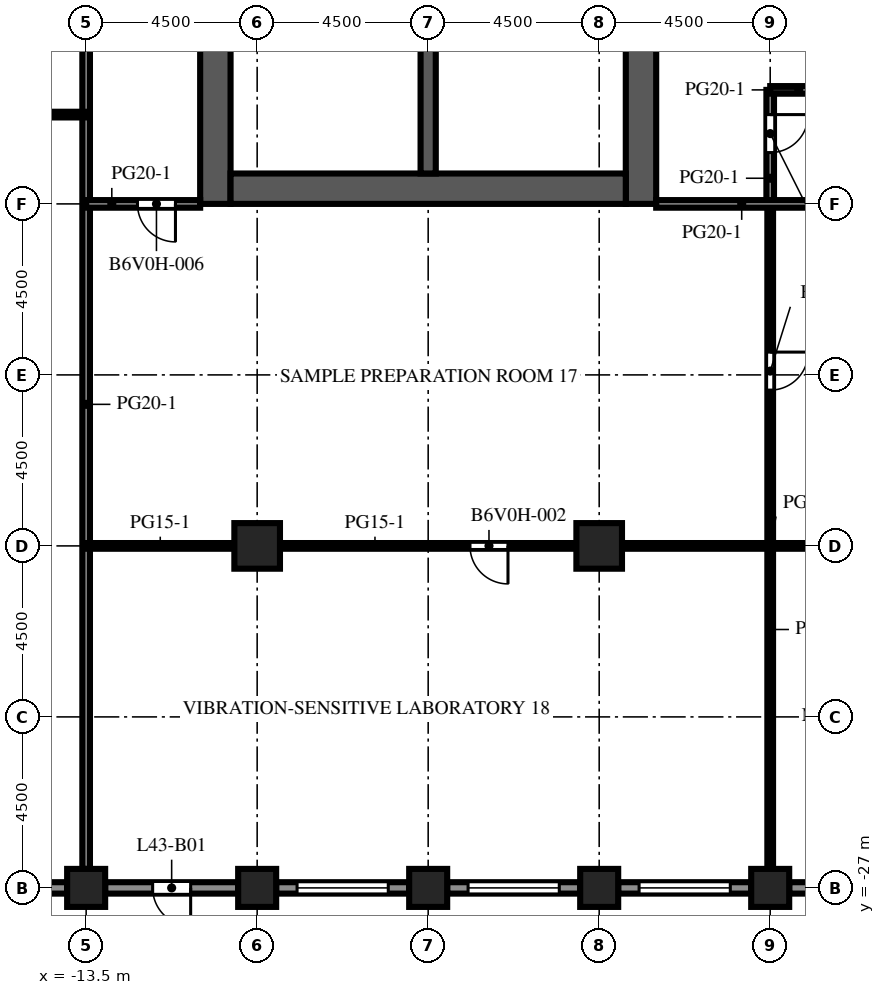
"""IFC4 building model, lengths in metres.
Left out: names, types, materials, properties, quantities, classifications, styles, units other than length and angle.
Written with IfcOpenShell. Run it as: python <this file> out.ifc"""

import sys

from ifc_helpers import new_model, si_unit, direction, frame, frame_2d, origin, origin_2d, place, context, subcontext, project, spatial, rectangle, extrude, element, fill, save


model = new_model("IFC4")
c1 = context("Model", 3, precision=1e-05, world=origin(), true_north=direction((0.0, 1.0)))
c2 = subcontext(c1, "Body", "Model", "MODEL_VIEW")
j1 = project(units=[si_unit("LENGTHUNIT", "METRE"), si_unit("PLANEANGLEUNIT", "RADIAN")], contexts=[c1])
p1 = place(None, origin())
s1 = spatial("IfcSite", under=j1, at=p1, CompositionType="ELEMENT")
p2 = place(p1, origin())
s2 = spatial("IfcBuilding", under=s1, at=p2, CompositionType="ELEMENT")
p3 = place(p2, frame((0.0, 0.0, 191.5)))
s3 = spatial("IfcBuildingStorey", under=s2, at=p3, CompositionType="ELEMENT", Elevation=191.5)
for number, where, z_axis, x_axis in (
    (1, (-13.5, -27.0, 0.0), (0.0, 0.0, 1.0), (1.0, 0.0, 0.0)),
    (2, (-9.0, -27.0, 0.0), (0.0, 0.0, 1.0), (1.0, 0.0, 0.0)),
    (3, (-4.5, -27.0, 0.0), (0.0, 0.0, 1.0), (1.0, 0.0, 0.0)),
    (4, (0.0, -27.0, 0.0), (0.0, 0.0, 1.0), (1.0, 0.0, 0.0)),
    (5, (4.5, -27.0, 0.0), (0.0, 0.0, 1.0), (1.0, 0.0, 0.0)),
):
    element("IfcColumn", number, at=place(p3, frame(where, z_axis=z_axis, x_axis=x_axis)), inside=s3, PredefinedType="COLUMN", context=c2, shape_type="SweptSolid", body=[
        extrude(rectangle(XDim=1.0, YDim=1.0, at=origin_2d()), origin(), (0.0, 0.0, 1.0), 4.1),
    ])
for number, where, z_axis, x_axis in (
    (6, (-9.0, -18.0, 0.0), (0.0, 0.0, 1.0), (1.0, 0.0, 0.0)),
    (7, (0.0, -18.0, 0.0), (0.0, 0.0, 1.0), (1.0, 0.0, 0.0)),
):
    element("IfcColumn", number, at=place(p3, frame(where, z_axis=z_axis, x_axis=x_axis)), inside=s3, PredefinedType="COLUMN", context=c2, shape_type="SweptSolid", body=[
        extrude(rectangle(XDim=1.2, YDim=1.2, at=origin_2d()), origin(), (0.0, 0.0, 1.0), 4.1),
    ])
p4 = place(p3, frame((-10.1, -9.0, 0.0), z_axis=(0.0, 0.0, 1.0), x_axis=(0.0, 1.0, 0.0)))
e8 = element("IfcWall", 8, at=p4, inside=s3, PredefinedType="SHEAR", context=c2, shape_type="SweptSolid", body=[
    extrude(rectangle(XDim=27.5, YDim=0.8, at=frame_2d((13.75, 0.0))), origin(), (0.0, 0.0, 1.0), 4.1),
])
p5 = place(p4, frame((12.55, 0.0, 0.0)))
e9 = element("IfcOpeningElement", 9, at=p5, cuts=e8, PredefinedType="OPENING", context=c2, shape_type="SweptSolid", body=[
    extrude(rectangle(XDim=2.4, YDim=2.4, at=frame_2d((1.2, 1.2))), frame((0.0, 0.41, 0.0), z_axis=(0.0, -1.0, 0.0), x_axis=(1.0, 0.0, 0.0)), (0.0, 0.0, 1.0), 0.82),
])
p6 = place(p4, frame((6.825, 0.0, 0.0)))
e10 = element("IfcOpeningElement", 10, at=p6, cuts=e8, PredefinedType="OPENING", context=c2, shape_type="SweptSolid", body=[
    extrude(rectangle(XDim=1.2, YDim=2.1, at=frame_2d((0.6, 1.05))), frame((0.0, 0.41, 0.0), z_axis=(0.0, -1.0, 0.0), x_axis=(1.0, 0.0, 0.0)), (0.0, 0.0, 1.0), 0.82),
])
p7 = place(p4, frame((19.475, 0.0, 0.0)))
e11 = element("IfcOpeningElement", 11, at=p7, cuts=e8, PredefinedType="OPENING", context=c2, shape_type="SweptSolid", body=[
    extrude(rectangle(XDim=1.2, YDim=2.1, at=frame_2d((0.6, 1.05))), frame((0.0, 0.41, 0.0), z_axis=(0.0, -1.0, 0.0), x_axis=(1.0, 0.0, 0.0)), (0.0, 0.0, 1.0), 0.82),
])
p8 = place(p3, frame((1.1, -9.0, 0.0), z_axis=(0.0, 0.0, 1.0), x_axis=(0.0, 1.0, 0.0)))
e12 = element("IfcWall", 12, at=p8, inside=s3, PredefinedType="SHEAR", context=c2, shape_type="SweptSolid", body=[
    extrude(rectangle(XDim=27.5, YDim=0.8, at=frame_2d((13.75, 0.0))), origin(), (0.0, 0.0, 1.0), 4.1),
])
p9 = place(p8, frame((12.55, 0.0, 0.0)))
e13 = element("IfcOpeningElement", 13, at=p9, cuts=e12, PredefinedType="OPENING", context=c2, shape_type="SweptSolid", body=[
    extrude(rectangle(XDim=2.4, YDim=2.4, at=frame_2d((1.2, 1.2))), frame((0.0, 0.41, 0.0), z_axis=(0.0, -1.0, 0.0), x_axis=(1.0, 0.0, 0.0)), (0.0, 0.0, 1.0), 0.82),
])
p10 = place(p8, frame((3.95, 0.0, 0.0)))
e14 = element("IfcOpeningElement", 14, at=p10, cuts=e12, PredefinedType="OPENING", context=c2, shape_type="SweptSolid", body=[
    extrude(rectangle(XDim=1.2, YDim=2.1, at=frame_2d((0.6, 1.05))), frame((0.0, 0.41, 0.0), z_axis=(0.0, -1.0, 0.0), x_axis=(1.0, 0.0, 0.0)), (0.0, 0.0, 1.0), 0.82),
])
p11 = place(p8, frame((19.45, 0.0, 0.0)))
e15 = element("IfcOpeningElement", 15, at=p11, cuts=e12, PredefinedType="OPENING", context=c2, shape_type="SweptSolid", body=[
    extrude(rectangle(XDim=1.0, YDim=2.1, at=frame_2d((0.5, 1.05))), frame((0.0, 0.41, 0.0), z_axis=(0.0, -1.0, 0.0), x_axis=(1.0, 0.0, 0.0)), (0.0, 0.0, 1.0), 0.82),
])
p12 = place(p8, frame((21.137, 0.0, 0.0)))
e16 = element("IfcOpeningElement", 16, at=p12, cuts=e12, PredefinedType="OPENING", context=c2, shape_type="SweptSolid", body=[
    extrude(rectangle(XDim=1.0, YDim=2.1, at=frame_2d((0.5, 1.05))), frame((0.0, 0.41, 0.0), z_axis=(0.0, -1.0, 0.0), x_axis=(1.0, 0.0, 0.0)), (0.0, 0.0, 1.0), 0.82),
])
p13 = place(p8, frame((23.2, 0.0, 0.0)))
e17 = element("IfcOpeningElement", 17, at=p13, cuts=e12, PredefinedType="OPENING", context=c2, shape_type="SweptSolid", body=[
    extrude(rectangle(XDim=1.0, YDim=2.1, at=frame_2d((0.5, 1.05))), frame((0.0, 0.41, 0.0), z_axis=(0.0, -1.0, 0.0), x_axis=(1.0, 0.0, 0.0)), (0.0, 0.0, 1.0), 0.82),
])
p14 = place(p8, frame((25.262, 0.0, 0.0)))
e18 = element("IfcOpeningElement", 18, at=p14, cuts=e12, PredefinedType="OPENING", context=c2, shape_type="SweptSolid", body=[
    extrude(rectangle(XDim=1.0, YDim=2.1, at=frame_2d((0.5, 1.05))), frame((0.0, 0.41, 0.0), z_axis=(0.0, -1.0, 0.0), x_axis=(1.0, 0.0, 0.0)), (0.0, 0.0, 1.0), 0.82),
])
p15 = place(p3, frame((-9.7, -8.6, 0.0), z_axis=(0.0, 0.0, 1.0), x_axis=(1.0, 0.0, 0.0)))
e19 = element("IfcWall", 19, at=p15, inside=s3, PredefinedType="SHEAR", context=c2, shape_type="SweptSolid", body=[
    extrude(rectangle(XDim=10.4, YDim=0.8, at=frame_2d((5.2, 0.0))), origin(), (0.0, 0.0, 1.0), 4.1),
])
p16 = place(p3, frame((-4.5, -8.2, 0.0), z_axis=(0.0, 0.0, 1.0), x_axis=(0.0, 1.0, 0.0)))
e20 = element("IfcWall", 20, at=p16, inside=s3, PredefinedType="SHEAR", context=c2, shape_type="SweptSolid", body=[
    extrude(rectangle(XDim=7.5, YDim=0.4, at=frame_2d((3.75, 0.0))), origin(), (0.0, 0.0, 1.0), 4.1),
])
p17 = place(p3, frame((-14.0, -27.0, 0.0), z_axis=(0.0, 0.0, 1.0), x_axis=(-1.0, 0.0, 0.0)))
e21 = element("IfcWall", 21, at=p17, inside=s3, PredefinedType="SOLIDWALL", context=c2, shape_type="SweptSolid", body=[
    extrude(rectangle(XDim=3.5, YDim=0.3, at=frame_2d((1.75, 0.0))), origin(), (0.0, 0.0, 1.0), 2.85),
])
p18 = place(p17, frame((0.55, 0.0, 0.8)))
e22 = element("IfcOpeningElement", 22, at=p18, cuts=e21, PredefinedType="OPENING", context=c2, shape_type="SweptSolid", body=[
    extrude(rectangle(XDim=2.4, YDim=1.7, at=frame_2d((1.2, 0.85))), frame((0.0, 0.16, 0.0), z_axis=(0.0, -1.0, 0.0), x_axis=(1.0, 0.0, 0.0)), (0.0, 0.0, 1.0), 0.32),
])
p19 = place(p3, frame((-9.5, -27.0, 0.0), z_axis=(0.0, 0.0, 1.0), x_axis=(-1.0, 0.0, 0.0)))
e23 = element("IfcWall", 23, at=p19, inside=s3, PredefinedType="SOLIDWALL", context=c2, shape_type="SweptSolid", body=[
    extrude(rectangle(XDim=3.5, YDim=0.3, at=frame_2d((1.75, 0.0))), origin(), (0.0, 0.0, 1.0), 2.85),
])
p20 = place(p19, frame((1.25, 0.0, 0.0)))
e24 = element("IfcOpeningElement", 24, at=p20, cuts=e23, PredefinedType="OPENING", context=c2, shape_type="SweptSolid", body=[
    extrude(rectangle(XDim=1.0, YDim=2.2, at=frame_2d((0.5, 1.1))), frame((0.0, 0.16, 0.0), z_axis=(0.0, -1.0, 0.0), x_axis=(1.0, 0.0, 0.0)), (0.0, 0.0, 1.0), 0.32),
])
p21 = place(p3, frame((-5.0, -27.0, 0.0), z_axis=(0.0, 0.0, 1.0), x_axis=(-1.0, 0.0, 0.0)))
e25 = element("IfcWall", 25, at=p21, inside=s3, PredefinedType="SOLIDWALL", context=c2, shape_type="SweptSolid", body=[
    extrude(rectangle(XDim=3.5, YDim=0.3, at=frame_2d((1.75, 0.0))), origin(), (0.0, 0.0, 1.0), 2.85),
])
p22 = place(p21, frame((0.55, 0.0, 0.8)))
e26 = element("IfcOpeningElement", 26, at=p22, cuts=e25, PredefinedType="OPENING", context=c2, shape_type="SweptSolid", body=[
    extrude(rectangle(XDim=2.4, YDim=1.7, at=frame_2d((1.2, 0.85))), frame((0.0, 0.16, 0.0), z_axis=(0.0, -1.0, 0.0), x_axis=(1.0, 0.0, 0.0)), (0.0, 0.0, 1.0), 0.32),
])
p23 = place(p3, frame((-0.5, -27.0, 0.0), z_axis=(0.0, 0.0, 1.0), x_axis=(-1.0, 0.0, 0.0)))
e27 = element("IfcWall", 27, at=p23, inside=s3, PredefinedType="SOLIDWALL", context=c2, shape_type="SweptSolid", body=[
    extrude(rectangle(XDim=3.5, YDim=0.3, at=frame_2d((1.75, 0.0))), origin(), (0.0, 0.0, 1.0), 2.85),
])
p24 = place(p23, frame((0.55, 0.0, 0.8)))
e28 = element("IfcOpeningElement", 28, at=p24, cuts=e27, PredefinedType="OPENING", context=c2, shape_type="SweptSolid", body=[
    extrude(rectangle(XDim=2.4, YDim=1.7, at=frame_2d((1.2, 0.85))), frame((0.0, 0.16, 0.0), z_axis=(0.0, -1.0, 0.0), x_axis=(1.0, 0.0, 0.0)), (0.0, 0.0, 1.0), 0.32),
])
p25 = place(p3, frame((4.0, -27.0, 0.0), z_axis=(0.0, 0.0, 1.0), x_axis=(-1.0, 0.0, 0.0)))
e29 = element("IfcWall", 29, at=p25, inside=s3, PredefinedType="SOLIDWALL", context=c2, shape_type="SweptSolid", body=[
    extrude(rectangle(XDim=3.5, YDim=0.3, at=frame_2d((1.75, 0.0))), origin(), (0.0, 0.0, 1.0), 2.85),
])
p26 = place(p25, frame((0.55, 0.0, 0.8)))
e30 = element("IfcOpeningElement", 30, at=p26, cuts=e29, PredefinedType="OPENING", context=c2, shape_type="SweptSolid", body=[
    extrude(rectangle(XDim=2.4, YDim=1.7, at=frame_2d((1.2, 0.85))), frame((0.0, 0.16, 0.0), z_axis=(0.0, -1.0, 0.0), x_axis=(1.0, 0.0, 0.0)), (0.0, 0.0, 1.0), 0.32),
])
p27 = place(p3, frame((8.5, -27.0, 0.0), z_axis=(0.0, 0.0, 1.0), x_axis=(-1.0, 0.0, 0.0)))
e31 = element("IfcWall", 31, at=p27, inside=s3, PredefinedType="SOLIDWALL", context=c2, shape_type="SweptSolid", body=[
    extrude(rectangle(XDim=3.5, YDim=0.3, at=frame_2d((1.75, 0.0))), origin(), (0.0, 0.0, 1.0), 2.85),
])
p28 = place(p27, frame((0.55, 0.0, 0.8)))
e32 = element("IfcOpeningElement", 32, at=p28, cuts=e31, PredefinedType="OPENING", context=c2, shape_type="SweptSolid", body=[
    extrude(rectangle(XDim=2.4, YDim=1.7, at=frame_2d((1.2, 0.85))), frame((0.0, 0.16, 0.0), z_axis=(0.0, -1.0, 0.0), x_axis=(1.0, 0.0, 0.0)), (0.0, 0.0, 1.0), 0.32),
])
p29 = place(p3, frame((-0.9, -5.95, 0.0), z_axis=(0.0, 0.0, 1.0), x_axis=(1.0, 0.0, 0.0)))
e33 = element("IfcWall", 33, at=p29, inside=s3, PredefinedType="PARTITIONING", context=c2, shape_type="SweptSolid", body=[
    extrude(rectangle(XDim=1.6, YDim=0.1, at=frame_2d((0.8, 0.0))), origin(), (0.0, 0.0, 1.0), 3.65),
])
p30 = place(p29, frame((0.3, 0.0, 0.0)))
e34 = element("IfcOpeningElement", 34, at=p30, cuts=e33, PredefinedType="OPENING", context=c2, shape_type="SweptSolid", body=[
    extrude(rectangle(XDim=1.0, YDim=2.1, at=frame_2d((0.5, 1.05))), frame((0.0, 0.06, 0.0), z_axis=(0.0, -1.0, 0.0), x_axis=(1.0, 0.0, 0.0)), (0.0, 0.0, 1.0), 0.12),
])
p31 = place(p3, frame((-0.9, -5.95, 0.0), z_axis=(0.0, 0.0, 1.0), x_axis=(0.0, 1.0, 0.0)))
e35 = element("IfcWall", 35, at=p31, inside=s3, PredefinedType="PARTITIONING", context=c2, shape_type="SweptSolid", body=[
    extrude(rectangle(XDim=3.0, YDim=0.1, at=frame_2d((1.5, 0.0))), origin(), (0.0, 0.0, 1.0), 3.65),
])
p32 = place(p31, frame((1.0, 0.0, 0.0)))
e36 = element("IfcOpeningElement", 36, at=p32, cuts=e35, PredefinedType="OPENING", context=c2, shape_type="SweptSolid", body=[
    extrude(rectangle(XDim=1.0, YDim=2.1, at=frame_2d((0.5, 1.05))), frame((0.0, 0.06, 0.0), z_axis=(0.0, -1.0, 0.0), x_axis=(1.0, 0.0, 0.0)), (0.0, 0.0, 1.0), 0.12),
])
p33 = place(p3, frame((-4.3, -5.95, 0.0), z_axis=(0.0, 0.0, 1.0), x_axis=(1.0, 0.0, 0.0)))
e37 = element("IfcWall", 37, at=p33, inside=s3, PredefinedType="PARTITIONING", context=c2, shape_type="SweptSolid", body=[
    extrude(rectangle(XDim=3.4, YDim=0.1, at=frame_2d((1.7, 0.0))), origin(), (0.0, 0.0, 1.0), 3.65),
])
p34 = place(p3, frame((-13.5, -26.5, 0.0), z_axis=(0.0, 0.0, 1.0), x_axis=(0.0, 1.0, 0.0)))
e38 = element("IfcWall", 38, at=p34, inside=s3, PredefinedType="PARTITIONING", context=c2, shape_type="SweptSolid", body=[
    extrude(rectangle(XDim=29.75, YDim=0.2, at=frame_2d((14.875, 0.0))), origin(), (0.0, 0.0, 1.0), 3.65),
])
p35 = place(p34, frame((24.45, 0.0, 0.0)))
e39 = element("IfcOpeningElement", 39, at=p35, cuts=e38, PredefinedType="OPENING", context=c2, shape_type="SweptSolid", body=[
    extrude(rectangle(XDim=1.0, YDim=2.1, at=frame_2d((0.5, 1.05))), frame((0.0, 0.11, 0.0), z_axis=(0.0, -1.0, 0.0), x_axis=(1.0, 0.0, 0.0)), (0.0, 0.0, 1.0), 0.22),
])
p36 = place(p3, frame((4.5, -9.0, 0.0), z_axis=(0.0, 0.0, 1.0), x_axis=(0.0, -1.0, 0.0)))
e40 = element("IfcWall", 40, at=p36, inside=s3, PredefinedType="PARTITIONING", context=c2, shape_type="SweptSolid", body=[
    extrude(rectangle(XDim=17.5, YDim=0.15, at=frame_2d((8.75, 0.0))), origin(), (0.0, 0.0, 1.0), 3.65),
])
p37 = place(p36, frame((3.9, 0.0, 0.0)))
e41 = element("IfcOpeningElement", 41, at=p37, cuts=e40, PredefinedType="OPENING", context=c2, shape_type="SweptSolid", body=[
    extrude(rectangle(XDim=1.0, YDim=2.1, at=frame_2d((0.5, 1.05))), frame((0.0, 0.085, 0.0), z_axis=(0.0, -1.0, 0.0), x_axis=(1.0, 0.0, 0.0)), (0.0, 0.0, 1.0), 0.17),
])
p38 = place(p3, frame((4.5, -6.0, 0.0), z_axis=(0.0, 0.0, 1.0), x_axis=(0.0, -1.0, 0.0)))
e42 = element("IfcWall", 42, at=p38, inside=s3, PredefinedType="PARTITIONING", context=c2, shape_type="SweptSolid", body=[
    extrude(rectangle(XDim=3.0, YDim=0.2, at=frame_2d((1.5, 0.0))), origin(), (0.0, 0.0, 1.0), 3.65),
])
p39 = place(p38, frame((0.65, 0.0, 0.0)))
e43 = element("IfcOpeningElement", 43, at=p39, cuts=e42, PredefinedType="OPENING", context=c2, shape_type="SweptSolid", body=[
    extrude(rectangle(XDim=1.0, YDim=2.1, at=frame_2d((0.5, 1.05))), frame((0.0, 0.11, 0.0), z_axis=(0.0, -1.0, 0.0), x_axis=(1.0, 0.0, 0.0)), (0.0, 0.0, 1.0), 0.22),
])
p40 = place(p3, frame((-13.5, -18.0, 0.0), z_axis=(0.0, 0.0, 1.0), x_axis=(1.0, 0.0, 0.0)))
e44 = element("IfcWall", 44, at=p40, inside=s3, PredefinedType="PARTITIONING", context=c2, shape_type="SweptSolid", body=[
    extrude(rectangle(XDim=3.9, YDim=0.15, at=frame_2d((1.95, 0.0))), origin(), (0.0, 0.0, 1.0), 3.65),
])
p41 = place(p3, frame((-0.6, -18.0, 0.0), z_axis=(0.0, 0.0, 1.0), x_axis=(-1.0, 0.0, 0.0)))
e45 = element("IfcWall", 45, at=p41, inside=s3, PredefinedType="PARTITIONING", context=c2, shape_type="SweptSolid", body=[
    extrude(rectangle(XDim=7.8, YDim=0.15, at=frame_2d((3.9, 0.0))), origin(), (0.0, 0.0, 1.0), 3.65),
])
p42 = place(p41, frame((1.8, 0.0, 0.0)))
e46 = element("IfcOpeningElement", 46, at=p42, cuts=e45, PredefinedType="OPENING", context=c2, shape_type="SweptSolid", body=[
    extrude(rectangle(XDim=1.0, YDim=2.1, at=frame_2d((0.5, 1.05))), frame((0.0, 0.085, 0.0), z_axis=(0.0, -1.0, 0.0), x_axis=(1.0, 0.0, 0.0)), (0.0, 0.0, 1.0), 0.17),
])
p43 = place(p3, frame((0.6, -18.0, 0.0), z_axis=(0.0, 0.0, 1.0), x_axis=(1.0, 0.0, 0.0)))
e47 = element("IfcWall", 47, at=p43, inside=s3, PredefinedType="PARTITIONING", context=c2, shape_type="SweptSolid", body=[
    extrude(rectangle(XDim=7.8, YDim=0.15, at=frame_2d((3.9, 0.0))), origin(), (0.0, 0.0, 1.0), 3.65),
])
p44 = place(p3, frame((-10.5, -9.0, 0.0), z_axis=(0.0, 0.0, 1.0), x_axis=(-1.0, 0.0, 0.0)))
e48 = element("IfcWall", 48, at=p44, inside=s3, PredefinedType="PARTITIONING", context=c2, shape_type="SweptSolid", body=[
    extrude(rectangle(XDim=3.0, YDim=0.2, at=frame_2d((1.5, 0.0))), origin(), (0.0, 0.0, 1.0), 3.65),
])
p45 = place(p44, frame((0.65, 0.0, 0.0)))
e49 = element("IfcOpeningElement", 49, at=p45, cuts=e48, PredefinedType="OPENING", context=c2, shape_type="SweptSolid", body=[
    extrude(rectangle(XDim=1.0, YDim=2.1, at=frame_2d((0.5, 1.05))), frame((0.0, 0.11, 0.0), z_axis=(0.0, -1.0, 0.0), x_axis=(1.0, 0.0, 0.0)), (0.0, 0.0, 1.0), 0.22),
])
p46 = place(p3, frame((1.5, -9.0, 0.0), z_axis=(0.0, 0.0, 1.0), x_axis=(1.0, 0.0, 0.0)))
e50 = element("IfcWall", 50, at=p46, inside=s3, PredefinedType="PARTITIONING", context=c2, shape_type="SweptSolid", body=[
    extrude(rectangle(XDim=4.5, YDim=0.2, at=frame_2d((2.25, 0.0))), origin(), (0.0, 0.0, 1.0), 3.65),
])
p47 = place(p3, frame((-13.5, -6.65, 0.0), z_axis=(0.0, 0.0, 1.0), x_axis=(-1.0, 0.0, 0.0)))
e51 = element("IfcWall", 51, at=p47, inside=s3, PredefinedType="PARTITIONING", context=c2, shape_type="SweptSolid", body=[
    extrude(rectangle(XDim=8.85, YDim=0.15, at=frame_2d((4.425, 0.0))), origin(), (0.0, 0.0, 1.0), 3.65),
])
p48 = place(p47, frame((4.9, 0.0, 0.0)))
e52 = element("IfcOpeningElement", 52, at=p48, cuts=e51, PredefinedType="OPENING", context=c2, shape_type="SweptSolid", body=[
    extrude(rectangle(XDim=1.0, YDim=2.1, at=frame_2d((0.5, 1.05))), frame((0.0, 0.085, 0.0), z_axis=(0.0, -1.0, 0.0), x_axis=(1.0, 0.0, 0.0)), (0.0, 0.0, 1.0), 0.17),
])
p49 = place(p3, frame((4.5, -6.0, 0.0), z_axis=(0.0, 0.0, 1.0), x_axis=(1.0, 0.0, 0.0)))
e53 = element("IfcWall", 53, at=p49, inside=s3, PredefinedType="PARTITIONING", context=c2, shape_type="SweptSolid", body=[
    extrude(rectangle(XDim=1.5, YDim=0.2, at=frame_2d((0.75, 0.0))), origin(), (0.0, 0.0, 1.0), 3.65),
])
p50 = place(p20, origin())
e54 = element("IfcDoor", 54, at=p50, inside=s3, OperationType="SINGLE_SWING_LEFT", PredefinedType="DOOR", context=c2, shape_type="SweptSolid", body=[
    extrude(rectangle(XDim=1.0, YDim=2.2, at=frame_2d((0.5, 1.1))), frame((0.0, 0.025, 0.0), z_axis=(0.0, -1.0, 0.0), x_axis=(1.0, 0.0, 0.0)), (0.0, 0.0, 1.0), 0.05),
])
fill(e24, e54)
p51 = place(p22, origin())
e55 = element("IfcWindow", 55, at=p51, inside=s3, PartitioningType="SINGLE_PANEL", PredefinedType="WINDOW", context=c2, shape_type="SweptSolid", body=[
    extrude(rectangle(XDim=2.4, YDim=1.7, at=frame_2d((1.2, 0.85))), frame((0.0, 0.03, 0.0), z_axis=(0.0, -1.0, 0.0), x_axis=(1.0, 0.0, 0.0)), (0.0, 0.0, 1.0), 0.06),
])
fill(e26, e55)
p52 = place(p24, origin())
e56 = element("IfcWindow", 56, at=p52, inside=s3, PartitioningType="SINGLE_PANEL", PredefinedType="WINDOW", context=c2, shape_type="SweptSolid", body=[
    extrude(rectangle(XDim=2.4, YDim=1.7, at=frame_2d((1.2, 0.85))), frame((0.0, 0.03, 0.0), z_axis=(0.0, -1.0, 0.0), x_axis=(1.0, 0.0, 0.0)), (0.0, 0.0, 1.0), 0.06),
])
fill(e28, e56)
p53 = place(p26, origin())
e57 = element("IfcWindow", 57, at=p53, inside=s3, PartitioningType="SINGLE_PANEL", PredefinedType="WINDOW", context=c2, shape_type="SweptSolid", body=[
    extrude(rectangle(XDim=2.4, YDim=1.7, at=frame_2d((1.2, 0.85))), frame((0.0, 0.03, 0.0), z_axis=(0.0, -1.0, 0.0), x_axis=(1.0, 0.0, 0.0)), (0.0, 0.0, 1.0), 0.06),
])
fill(e30, e57)
p54 = place(p10, origin())
e58 = element("IfcDoor", 58, at=p54, inside=s3, OperationType="SINGLE_SWING_LEFT", PredefinedType="DOOR", context=c2, shape_type="SweptSolid", body=[
    extrude(rectangle(XDim=1.2, YDim=2.1, at=frame_2d((0.6, 1.05))), frame((0.0, 0.375, 0.0), z_axis=(0.0, -1.0, 0.0), x_axis=(1.0, 0.0, 0.0)), (0.0, 0.0, 1.0), 0.05),
])
fill(e14, e58)
p55 = place(p30, origin())
e59 = element("IfcDoor", 59, at=p55, inside=s3, OperationType="SINGLE_SWING_RIGHT", PredefinedType="DOOR", context=c2, shape_type="SweptSolid", body=[
    extrude(rectangle(XDim=1.0, YDim=2.1, at=frame_2d((0.5, 1.05))), frame((0.0, 0.025, 0.0), z_axis=(0.0, -1.0, 0.0), x_axis=(1.0, 0.0, 0.0)), (0.0, 0.0, 1.0), 0.05),
])
fill(e34, e59)
p56 = place(p42, origin())
e60 = element("IfcDoor", 60, at=p56, inside=s3, OperationType="SINGLE_SWING_LEFT", PredefinedType="DOOR", context=c2, shape_type="SweptSolid", body=[
    extrude(rectangle(XDim=1.0, YDim=2.1, at=frame_2d((0.5, 1.05))), frame((0.0, 0.025, 0.0), z_axis=(0.0, -1.0, 0.0), x_axis=(1.0, 0.0, 0.0)), (0.0, 0.0, 1.0), 0.05),
])
fill(e46, e60)
p57 = place(p45, origin())
e61 = element("IfcDoor", 61, at=p57, inside=s3, OperationType="SINGLE_SWING_LEFT", PredefinedType="DOOR", context=c2, shape_type="SweptSolid", body=[
    extrude(rectangle(XDim=1.0, YDim=2.1, at=frame_2d((0.5, 1.05))), frame((0.0, 0.025, 0.0), z_axis=(0.0, -1.0, 0.0), x_axis=(1.0, 0.0, 0.0)), (0.0, 0.0, 1.0), 0.05),
])
fill(e49, e61)
p58 = place(p37, origin())
e62 = element("IfcDoor", 62, at=p58, inside=s3, OperationType="SINGLE_SWING_LEFT", PredefinedType="DOOR", context=c2, shape_type="SweptSolid", body=[
    extrude(rectangle(XDim=1.0, YDim=2.1, at=frame_2d((0.5, 1.05))), frame((0.0, 0.025, 0.0), z_axis=(0.0, -1.0, 0.0), x_axis=(1.0, 0.0, 0.0)), (0.0, 0.0, 1.0), 0.05),
])
fill(e41, e62)
p59 = place(p39, origin())
e63 = element("IfcDoor", 63, at=p59, inside=s3, OperationType="SINGLE_SWING_LEFT", PredefinedType="DOOR", context=c2, shape_type="SweptSolid", body=[
    extrude(rectangle(XDim=1.0, YDim=2.1, at=frame_2d((0.5, 1.05))), frame((0.0, 0.025, 0.0), z_axis=(0.0, -1.0, 0.0), x_axis=(1.0, 0.0, 0.0)), (0.0, 0.0, 1.0), 0.05),
])
fill(e43, e63)
save(model, sys.argv[1])
